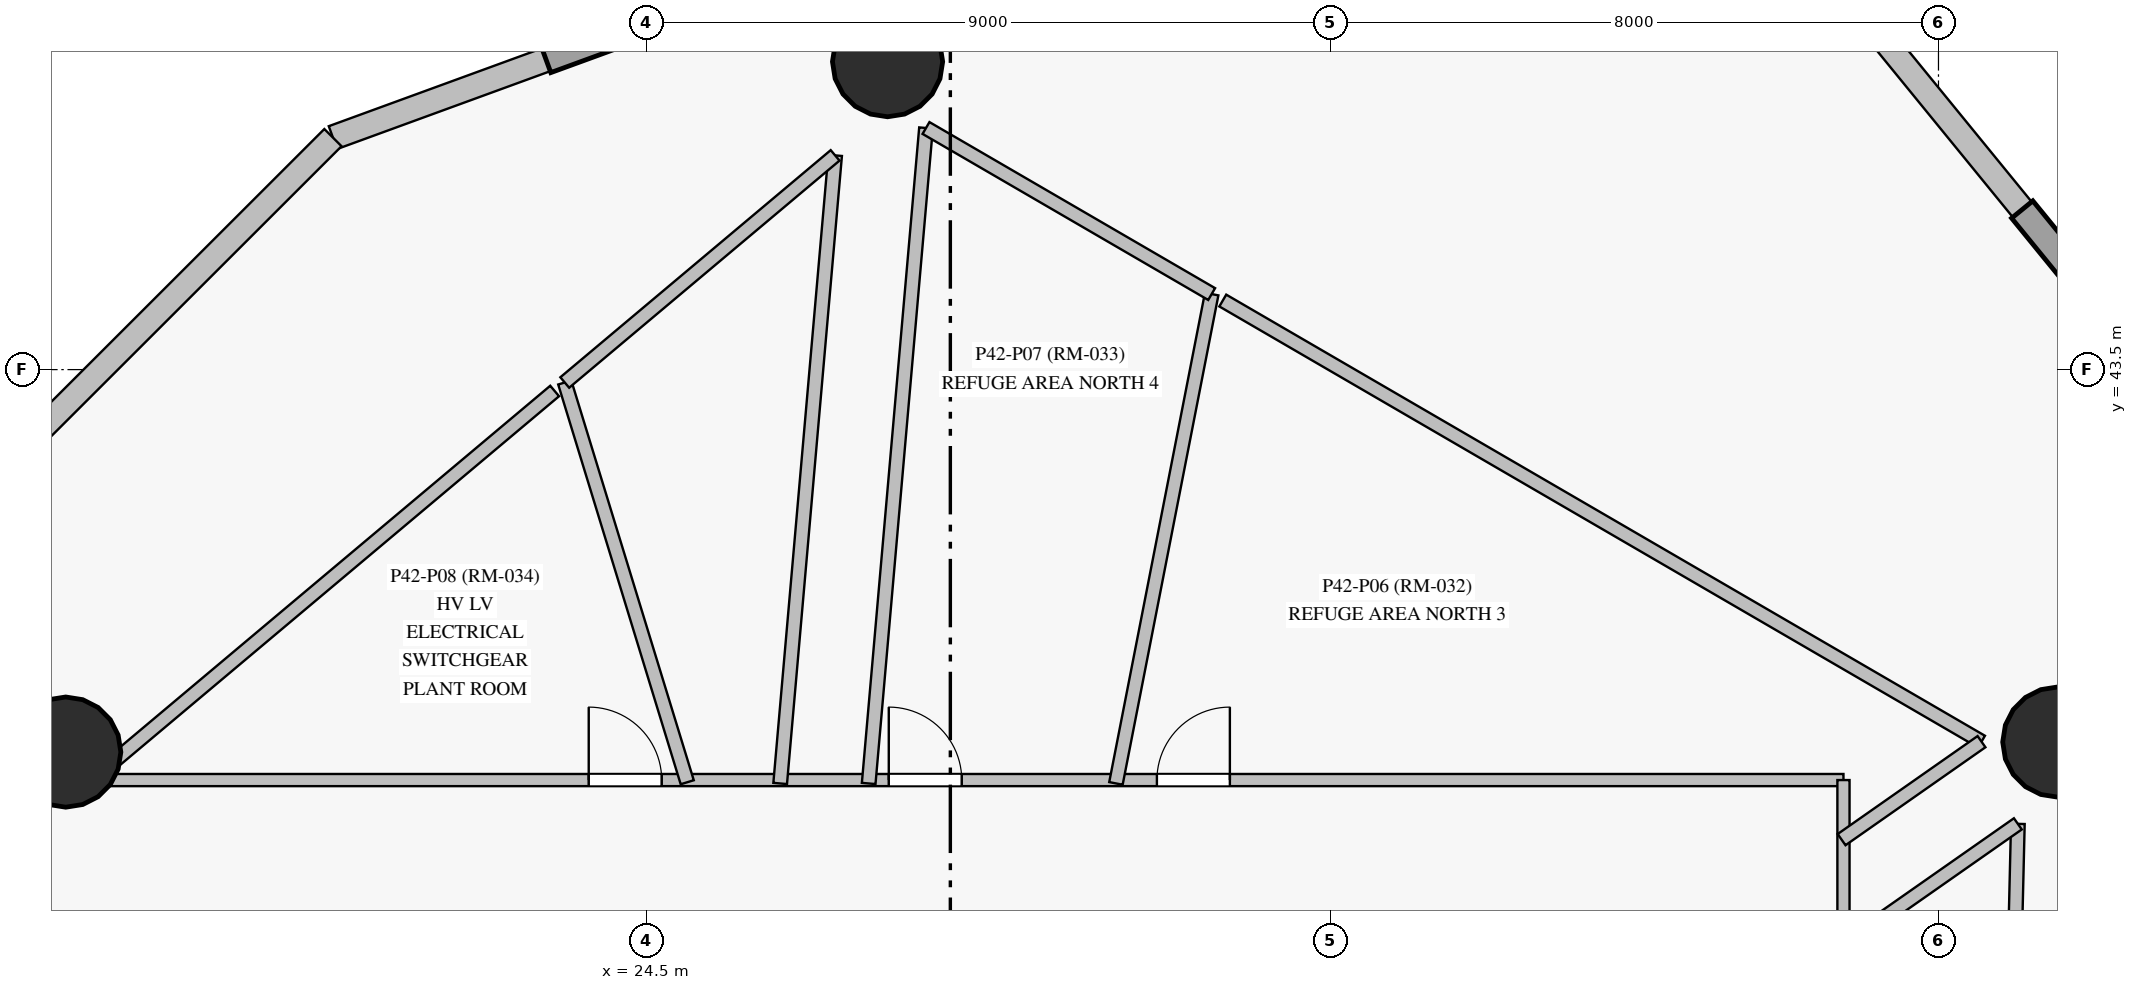
"""IFC4 building model, lengths in metres.
Left out: names, types, materials, properties, quantities, classifications, styles, units other than length and angle.
Written with IfcOpenShell. Run it as: python <this file> out.ifc"""

import sys

from ifc_helpers import new_model, si_unit, direction, frame, frame_2d, origin, origin_with_axes, origin_2d, place, context, subcontext, project, spatial, rectangle, circle, extrude, source, transform, mapped, element, fill, save


model = new_model("IFC4")
c1 = context("Model", 3, precision=1e-05, world=origin(), true_north=direction((0.0, 1.0)))
c2 = subcontext(c1, "Body", "Model", "MODEL_VIEW")
j1 = project(units=[si_unit("LENGTHUNIT", "METRE"), si_unit("PLANEANGLEUNIT", "RADIAN")], contexts=[c1])
p1 = place(None, origin())
s1 = spatial("IfcSite", under=j1, at=p1, CompositionType="ELEMENT")
p2 = place(p1, origin())
s2 = spatial("IfcBuilding", under=s1, at=p2, CompositionType="ELEMENT")
p3 = place(p2, frame((0.0, 0.0, 148.05)))
s3 = spatial("IfcBuildingStorey", under=s2, at=p3, CompositionType="ELEMENT", Elevation=148.05)
m1 = source(origin_with_axes(), c2, "Body", "SweptSolid", [
    extrude(circle(Radius=0.725, at=origin_2d()), origin(), (0.0, 0.0, 1.0), 4.5),
])
for number, where, z_axis, x_axis in (
    (1, (43.07, 38.6, 0.0), (0.0, 0.0, 1.0), (1.0, 0.0, 0.0)),
    (2, (27.674, 47.551, 0.0), (0.0, 0.0, 1.0), (1.0, 0.0, 0.0)),
    (3, (16.862, 38.468, 0.0), (0.0, 0.0, 1.0), (1.0, 0.0, 0.0)),
):
    element("IfcColumn", number, at=place(p3, frame(where, z_axis=z_axis, x_axis=x_axis)), inside=s3, PredefinedType="COLUMN", context=c2, shape_type="MappedRepresentation", body=[
        mapped(m1, transform((0.0, 0.0, 0.0), scale=1.0)),
    ])
p4 = place(p3, frame((46.633, 40.667, 0.0), z_axis=(0.0, 0.0, 1.0), x_axis=(-0.632230676024, 0.774780209023, 0.0)))
e4 = element("IfcWall", 4, at=p4, inside=s3, PredefinedType="SOLIDWALL", context=c2, shape_type="SweptSolid", body=[
    extrude(rectangle(XDim=9.351, YDim=0.32, at=frame_2d((4.676, 0.0))), origin(), (0.0, 0.0, 1.0), 4.275),
])
p5 = place(p3, frame((29.18, 49.767, 0.0), z_axis=(0.0, 0.0, 1.0), x_axis=(-0.939309487997, -0.343070963153, 0.0)))
e5 = element("IfcWall", 5, at=p5, inside=s3, PredefinedType="SOLIDWALL", context=c2, shape_type="SweptSolid", body=[
    extrude(rectangle(XDim=9.372, YDim=0.32, at=frame_2d((4.686, 0.0))), origin(), (0.0, 0.0, 1.0), 4.275),
])
p6 = place(p3, frame((20.377, 46.552, 0.0), z_axis=(0.0, 0.0, 1.0), x_axis=(-0.70744932358, -0.706764072776, 0.0)))
e6 = element("IfcWall", 6, at=p6, inside=s3, PredefinedType="SOLIDWALL", context=c2, shape_type="SweptSolid", body=[
    extrude(rectangle(XDim=13.539, YDim=0.32, at=frame_2d((6.769, 0.0))), origin(), (0.0, 0.0, 1.0), 3.945),
])
p7 = place(p3, frame((15.8, 38.1, 0.0), z_axis=(0.0, 0.0, 1.0), x_axis=(1.0, 0.0, 0.0)))
e7 = element("IfcWall", 7, at=p7, inside=s3, PredefinedType="PARTITIONING", context=c2, shape_type="SweptSolid", body=[
    extrude(rectangle(XDim=24.45, YDim=0.16, at=frame_2d((12.225, 0.0))), origin(), (0.0, 0.0, 1.0), 3.375),
])
p8 = place(p7, frame((15.417, 0.0, 0.0)))
e8 = element("IfcOpeningElement", 8, at=p8, cuts=e7, PredefinedType="OPENING", context=c2, shape_type="SweptSolid", body=[
    extrude(rectangle(XDim=0.96, YDim=2.15, at=frame_2d((0.48, 1.075))), frame((0.0, 0.09, 0.0), z_axis=(0.0, -1.0, 0.0), x_axis=(1.0, 0.0, 0.0)), (0.0, 0.0, 1.0), 0.18),
])
p9 = place(p7, frame((11.89, 0.0, 0.0)))
e9 = element("IfcOpeningElement", 9, at=p9, cuts=e7, PredefinedType="OPENING", context=c2, shape_type="SweptSolid", body=[
    extrude(rectangle(XDim=0.96, YDim=2.15, at=frame_2d((0.48, 1.075))), frame((0.0, 0.09, 0.0), z_axis=(0.0, -1.0, 0.0), x_axis=(1.0, 0.0, 0.0)), (0.0, 0.0, 1.0), 0.18),
])
p10 = place(p7, frame((7.942, 0.0, 0.0)))
e10 = element("IfcOpeningElement", 10, at=p10, cuts=e7, PredefinedType="OPENING", context=c2, shape_type="SweptSolid", body=[
    extrude(rectangle(XDim=0.96, YDim=2.15, at=frame_2d((0.48, 1.075))), frame((0.0, 0.09, 0.0), z_axis=(0.0, -1.0, 0.0), x_axis=(1.0, 0.0, 0.0)), (0.0, 0.0, 1.0), 0.18),
])
p11 = place(p3, frame((40.25, 38.1, 0.0), z_axis=(0.0, 0.0, 1.0), x_axis=(0.0, -1.0, 0.0)))
e11 = element("IfcWall", 11, at=p11, inside=s3, PredefinedType="PARTITIONING", context=c2, shape_type="SweptSolid", body=[
    extrude(rectangle(XDim=23.0, YDim=0.16, at=frame_2d((11.5, 0.0))), origin(), (0.0, 0.0, 1.0), 3.375),
])
p12 = place(p11, frame((11.025, 0.0, 0.0)))
e12 = element("IfcOpeningElement", 12, at=p12, cuts=e11, PredefinedType="OPENING", context=c2, shape_type="SweptSolid", body=[
    extrude(rectangle(XDim=0.96, YDim=2.15, at=frame_2d((0.48, 1.075))), frame((0.0, 0.09, 0.0), z_axis=(0.0, -1.0, 0.0), x_axis=(1.0, 0.0, 0.0)), (0.0, 0.0, 1.0), 0.18),
])
p13 = place(p3, frame((42.544, 37.524, 0.0), z_axis=(0.0, 0.0, 1.0), x_axis=(-0.02381710021, -0.999716332635, 0.0)))
e13 = element("IfcWall", 13, at=p13, inside=s3, PredefinedType="PARTITIONING", context=c2, shape_type="SweptSolid", body=[
    extrude(rectangle(XDim=17.037, YDim=0.18, at=frame_2d((8.518, 0.0))), origin(), (0.0, 0.0, 1.0), 3.375),
])
p14 = place(p3, frame((32.084, 44.409, 0.0), z_axis=(0.0, 0.0, 1.0), x_axis=(0.864506545688, -0.502621559887, 0.0)))
e14 = element("IfcWall", 14, at=p14, inside=s3, PredefinedType="PARTITIONING", context=c2, shape_type="SweptSolid", body=[
    extrude(rectangle(XDim=11.546, YDim=0.18, at=frame_2d((5.773, 0.0))), origin(), (0.0, 0.0, 1.0), 3.375),
])
p15 = place(p3, frame((27.426, 38.055, 0.0), z_axis=(0.0, 0.0, 1.0), x_axis=(0.087122516356, 0.996197604466, 0.0)))
e15 = element("IfcWall", 15, at=p15, inside=s3, PredefinedType="PARTITIONING", context=c2, shape_type="SweptSolid", body=[
    extrude(rectangle(XDim=8.656, YDim=0.18, at=frame_2d((4.328, 0.0))), origin(), (0.0, 0.0, 1.0), 2.775),
])
p16 = place(p3, frame((26.984, 46.318, 0.0), z_axis=(0.0, 0.0, 1.0), x_axis=(-0.08712240554, -0.996197614157, 0.0)))
e16 = element("IfcWall", 16, at=p16, inside=s3, PredefinedType="PARTITIONING", context=c2, shape_type="SweptSolid", body=[
    extrude(rectangle(XDim=8.295, YDim=0.18, at=frame_2d((4.147, 0.0))), origin(), (0.0, 0.0, 1.0), 2.775),
])
p17 = place(p3, frame((17.167, 38.071, 0.0), z_axis=(0.0, 0.0, 1.0), x_axis=(0.765666999963, 0.643237160904, 0.0)))
e17 = element("IfcWall", 17, at=p17, inside=s3, PredefinedType="PARTITIONING", context=c2, shape_type="SweptSolid", body=[
    extrude(rectangle(XDim=8.002, YDim=0.18, at=frame_2d((4.001, 0.0))), origin(), (0.0, 0.0, 1.0), 3.375),
])
p18 = place(p3, frame((31.938, 44.494, 0.0), z_axis=(0.0, 0.0, 1.0), x_axis=(-0.191970305615, -0.981400734543, 0.0)))
e18 = element("IfcWall", 18, at=p18, inside=s3, PredefinedType="PARTITIONING", context=c2, shape_type="SweptSolid", body=[
    extrude(rectangle(XDim=6.56, YDim=0.18, at=frame_2d((3.28, 0.0))), origin(), (0.0, 0.0, 1.0), 4.275),
])
p19 = place(p3, frame((25.039, 38.071, 0.0), z_axis=(0.0, 0.0, 1.0), x_axis=(-0.292950308957, 0.95612766746, 0.0)))
e19 = element("IfcWall", 19, at=p19, inside=s3, PredefinedType="PARTITIONING", context=c2, shape_type="SweptSolid", body=[
    extrude(rectangle(XDim=5.5, YDim=0.18, at=frame_2d((2.75, 0.0))), origin(), (0.0, 0.0, 1.0), 4.275),
])
p20 = place(p3, frame((23.427, 43.33, 0.0), z_axis=(0.0, 0.0, 1.0), x_axis=(0.765656200165, 0.64325001605, 0.0)))
e20 = element("IfcWall", 20, at=p20, inside=s3, PredefinedType="PARTITIONING", context=c2, shape_type="SweptSolid", body=[
    extrude(rectangle(XDim=4.645, YDim=0.18, at=frame_2d((2.323, 0.0))), origin(), (0.0, 0.0, 1.0), 2.775),
])
p21 = place(p3, frame((28.18, 46.678, 0.0), z_axis=(0.0, 0.0, 1.0), x_axis=(0.864517402092, -0.502602886463, 0.0)))
e21 = element("IfcWall", 21, at=p21, inside=s3, PredefinedType="PARTITIONING", context=c2, shape_type="SweptSolid", body=[
    extrude(rectangle(XDim=4.347, YDim=0.18, at=frame_2d((2.173, 0.0))), origin(), (0.0, 0.0, 1.0), 3.375),
])
p22 = place(p3, frame((40.213, 35.892, 0.0), z_axis=(0.0, 0.0, 1.0), x_axis=(0.819175487294, 0.573542954814, 0.0)))
e22 = element("IfcWall", 22, at=p22, inside=s3, PredefinedType="PARTITIONING", context=c2, shape_type="SweptSolid", body=[
    extrude(rectangle(XDim=2.846, YDim=0.18, at=frame_2d((1.423, 0.0))), origin(), (0.0, 0.0, 1.0), 2.775),
])
p23 = place(p3, frame((42.066, 38.605, 0.0), z_axis=(0.0, 0.0, 1.0), x_axis=(-0.81918087615, -0.573535257983, 0.0)))
e23 = element("IfcWall", 23, at=p23, inside=s3, PredefinedType="PARTITIONING", context=c2, shape_type="SweptSolid", body=[
    extrude(rectangle(XDim=2.247, YDim=0.18, at=frame_2d((1.124, 0.0))), origin(), (0.0, 0.0, 1.0), 2.775),
])
m2 = source(origin_with_axes(), c2, "Body", "SweptSolid", [
    extrude(rectangle(XDim=0.96, YDim=2.15, at=frame_2d((0.48, 1.075))), frame((0.0, 0.025, 0.0), z_axis=(0.0, -1.0, 0.0), x_axis=(1.0, 0.0, 0.0)), (0.0, 0.0, 1.0), 0.05),
])
p24 = place(p8, origin())
e24 = element("IfcDoor", 24, at=p24, inside=s3, OperationType="SINGLE_SWING_RIGHT", PredefinedType="DOOR", context=c2, shape_type="MappedRepresentation", body=[
    mapped(m2, transform((0.0, 0.0, 0.0), scale=1.0)),
])
fill(e8, e24)
p25 = place(p9, origin())
e25 = element("IfcDoor", 25, at=p25, inside=s3, OperationType="SINGLE_SWING_LEFT", PredefinedType="DOOR", context=c2, shape_type="MappedRepresentation", body=[
    mapped(m2, transform((0.0, 0.0, 0.0), scale=1.0)),
])
fill(e9, e25)
p26 = place(p10, origin())
e26 = element("IfcDoor", 26, at=p26, inside=s3, OperationType="SINGLE_SWING_LEFT", PredefinedType="DOOR", context=c2, shape_type="MappedRepresentation", body=[
    mapped(m2, transform((0.0, 0.0, 0.0), scale=1.0)),
])
fill(e10, e26)
save(model, sys.argv[1])
